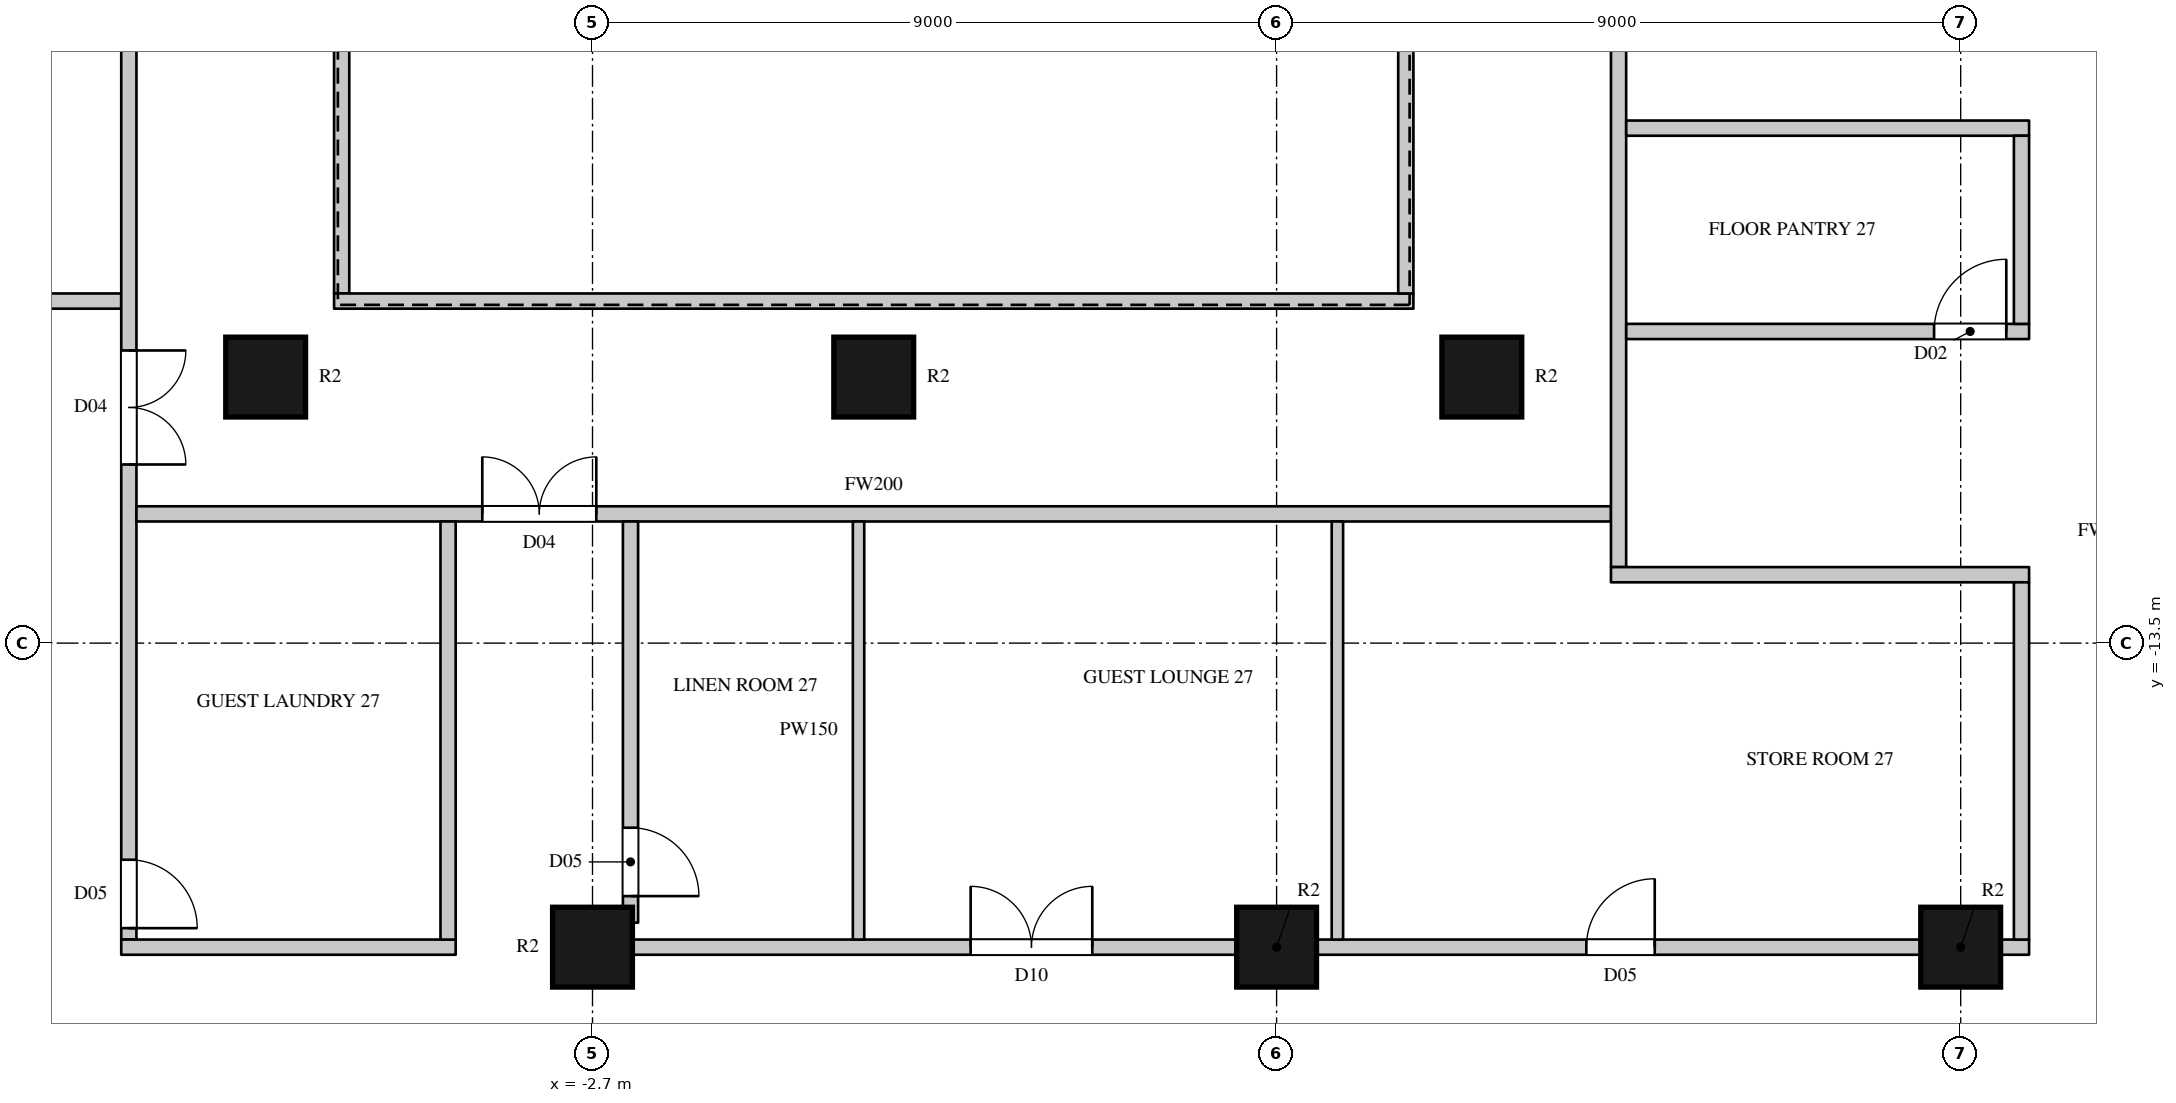
"""IFC4 building model, lengths in metres.
Left out: names, types, materials, properties, quantities, classifications, styles, units other than length and angle.
Written with IfcOpenShell. Run it as: python <this file> out.ifc"""

import sys

from ifc_helpers import new_model, si_unit, direction, frame, frame_2d, origin, origin_2d, place, context, subcontext, project, spatial, rectangle, circle, extrude, element, fill, save


model = new_model("IFC4")
c1 = context("Model", 3, precision=1e-05, world=origin(), true_north=direction((0.0, 1.0)))
c2 = subcontext(c1, "Body", "Model", "MODEL_VIEW")
j1 = project(units=[si_unit("LENGTHUNIT", "METRE"), si_unit("PLANEANGLEUNIT", "RADIAN")], contexts=[c1])
p1 = place(None, origin())
s1 = spatial("IfcSite", under=j1, at=p1, CompositionType="ELEMENT")
p2 = place(p1, origin())
s2 = spatial("IfcBuilding", under=s1, at=p2, CompositionType="ELEMENT")
p3 = place(p2, frame((0.0, 0.0, 127.5)))
s3 = spatial("IfcBuildingStorey", under=s2, at=p3, CompositionType="ELEMENT", Elevation=127.5)
for number, where, z_axis, x_axis in (
    (1, (-2.7, -17.5, 0.0), (0.0, 0.0, 1.0), (1.0, 0.0, 0.0)),
    (2, (6.3, -17.5, 0.0), (0.0, 0.0, 1.0), (1.0, 0.0, 0.0)),
    (3, (15.3, -17.5, 0.0), (0.0, 0.0, 1.0), (1.0, 0.0, 0.0)),
    (4, (-7.0, -10.0, 0.0), (0.0, 0.0, 1.0), (1.0, 0.0, 0.0)),
    (5, (1.0, -10.0, 0.0), (0.0, 0.0, 1.0), (1.0, 0.0, 0.0)),
    (6, (9.0, -10.0, 0.0), (0.0, 0.0, 1.0), (1.0, 0.0, 0.0)),
):
    element("IfcColumn", number, at=place(p3, frame(where, z_axis=z_axis, x_axis=x_axis)), inside=s3, PredefinedType="COLUMN", context=c2, shape_type="SweptSolid", body=[
        extrude(circle(Radius=0.525, at=origin_2d()), origin(), (0.0, 0.0, 1.0), 3.6),
    ])
p4 = place(p3, frame((-13.97, -9.0, 0.0), z_axis=(0.0, 0.0, 1.0), x_axis=(1.0, 0.0, 0.0)))
e7 = element("IfcWall", 7, at=p4, inside=s3, PredefinedType="PARTITIONING", context=c2, shape_type="SweptSolid", body=[
    extrude(rectangle(XDim=5.07, YDim=0.2, at=frame_2d((2.535, 0.0))), origin(), (0.0, 0.0, 1.0), 3.3),
])
p5 = place(p4, frame((0.4, 0.0, 0.0)))
e8 = element("IfcOpeningElement", 8, at=p5, cuts=e7, PredefinedType="OPENING", context=c2, shape_type="SweptSolid", body=[
    extrude(rectangle(XDim=1.5, YDim=2.2, at=frame_2d((0.75, 1.1))), frame((0.0, 0.11, 0.0), z_axis=(0.0, -1.0, 0.0), x_axis=(1.0, 0.0, 0.0)), (0.0, 0.0, 1.0), 0.22),
])
p6 = place(p4, frame((2.05, 0.0, 0.0)))
e9 = element("IfcOpeningElement", 9, at=p6, cuts=e7, PredefinedType="OPENING", context=c2, shape_type="SweptSolid", body=[
    extrude(rectangle(XDim=1.5, YDim=2.2, at=frame_2d((0.75, 1.1))), frame((0.0, 0.11, 0.0), z_axis=(0.0, -1.0, 0.0), x_axis=(1.0, 0.0, 0.0)), (0.0, 0.0, 1.0), 0.22),
])
p7 = place(p3, frame((-8.8, -17.4, 0.0), z_axis=(0.0, 0.0, 1.0), x_axis=(0.0, 1.0, 0.0)))
e10 = element("IfcWall", 10, at=p7, inside=s3, PredefinedType="PARTITIONING", context=c2, shape_type="SweptSolid", body=[
    extrude(rectangle(XDim=29.1, YDim=0.2, at=frame_2d((14.55, 0.0))), origin(), (0.0, 0.0, 1.0), 3.3),
])
p8 = place(p7, frame((21.15, 0.0, 0.0)))
e11 = element("IfcOpeningElement", 11, at=p8, cuts=e10, PredefinedType="OPENING", context=c2, shape_type="SweptSolid", body=[
    extrude(rectangle(XDim=1.5, YDim=2.2, at=frame_2d((0.75, 1.1))), frame((0.0, 0.11, 0.0), z_axis=(0.0, -1.0, 0.0), x_axis=(1.0, 0.0, 0.0)), (0.0, 0.0, 1.0), 0.22),
])
p9 = place(p7, frame((6.25, 0.0, 0.0)))
e12 = element("IfcOpeningElement", 12, at=p9, cuts=e10, PredefinedType="OPENING", context=c2, shape_type="SweptSolid", body=[
    extrude(rectangle(XDim=1.5, YDim=2.2, at=frame_2d((0.75, 1.1))), frame((0.0, 0.11, 0.0), z_axis=(0.0, -1.0, 0.0), x_axis=(1.0, 0.0, 0.0)), (0.0, 0.0, 1.0), 0.22),
])
p10 = place(p7, frame((27.45, 0.0, 0.0)))
e13 = element("IfcOpeningElement", 13, at=p10, cuts=e10, PredefinedType="OPENING", context=c2, shape_type="SweptSolid", body=[
    extrude(rectangle(XDim=1.5, YDim=2.2, at=frame_2d((0.75, 1.1))), frame((0.0, 0.11, 0.0), z_axis=(0.0, -1.0, 0.0), x_axis=(1.0, 0.0, 0.0)), (0.0, 0.0, 1.0), 0.22),
])
p11 = place(p7, frame((0.15, 0.0, 0.0)))
e14 = element("IfcOpeningElement", 14, at=p11, cuts=e10, PredefinedType="OPENING", context=c2, shape_type="SweptSolid", body=[
    extrude(rectangle(XDim=0.9, YDim=2.2, at=frame_2d((0.45, 1.1))), frame((0.0, 0.11, 0.0), z_axis=(0.0, -1.0, 0.0), x_axis=(1.0, 0.0, 0.0)), (0.0, 0.0, 1.0), 0.22),
])
p12 = place(p3, frame((-8.9, -17.5, 0.0), z_axis=(0.0, 0.0, 1.0), x_axis=(1.0, 0.0, 0.0)))
e15 = element("IfcWall", 15, at=p12, inside=s3, PredefinedType="PARTITIONING", context=c2, shape_type="SweptSolid", body=[
    extrude(rectangle(XDim=4.4, YDim=0.2, at=frame_2d((2.2, 0.0))), origin(), (0.0, 0.0, 1.0), 2.75),
])
p13 = place(p3, frame((-8.7, -11.8, 0.0), z_axis=(0.0, 0.0, 1.0), x_axis=(1.0, 0.0, 0.0)))
e16 = element("IfcWall", 16, at=p13, inside=s3, PredefinedType="PARTITIONING", context=c2, shape_type="SweptSolid", body=[
    extrude(rectangle(XDim=19.4, YDim=0.2, at=frame_2d((9.7, 0.0))), origin(), (0.0, 0.0, 1.0), 3.3),
])
p14 = place(p13, frame((4.55, 0.0, 0.0)))
e17 = element("IfcOpeningElement", 17, at=p14, cuts=e16, PredefinedType="OPENING", context=c2, shape_type="SweptSolid", body=[
    extrude(rectangle(XDim=1.5, YDim=2.2, at=frame_2d((0.75, 1.1))), frame((0.0, 0.11, 0.0), z_axis=(0.0, -1.0, 0.0), x_axis=(1.0, 0.0, 0.0)), (0.0, 0.0, 1.0), 0.22),
])
p15 = place(p3, frame((-6.0, -8.9, 0.0), z_axis=(0.0, 0.0, 1.0), x_axis=(0.0, 1.0, 0.0)))
e18 = element("IfcWall", 18, at=p15, inside=s3, PredefinedType="PARTITIONING", context=c2, shape_type="SweptSolid", body=[
    extrude(rectangle(XDim=17.8, YDim=0.2, at=frame_2d((8.9, 0.0))), origin(), (0.0, 0.0, 1.0), 3.3),
])
p16 = place(p3, frame((-6.1, -9.0, 0.0), z_axis=(0.0, 0.0, 1.0), x_axis=(1.0, 0.0, 0.0)))
e19 = element("IfcWall", 19, at=p16, inside=s3, PredefinedType="PARTITIONING", context=c2, shape_type="SweptSolid", body=[
    extrude(rectangle(XDim=14.2, YDim=0.2, at=frame_2d((7.1, 0.0))), origin(), (0.0, 0.0, 1.0), 3.3),
])
p17 = place(p3, frame((-4.6, -17.4, 0.0), z_axis=(0.0, 0.0, 1.0), x_axis=(0.0, 1.0, 0.0)))
e20 = element("IfcWall", 20, at=p17, inside=s3, PredefinedType="PARTITIONING", context=c2, shape_type="SweptSolid", body=[
    extrude(rectangle(XDim=5.5, YDim=0.2, at=frame_2d((2.75, 0.0))), origin(), (0.0, 0.0, 1.0), 3.3),
])
p18 = place(p3, frame((-2.2, -17.178, 0.0), z_axis=(0.0, 0.0, 1.0), x_axis=(0.0, 1.0, 0.0)))
e21 = element("IfcWall", 21, at=p18, inside=s3, PredefinedType="PARTITIONING", context=c2, shape_type="SweptSolid", body=[
    extrude(rectangle(XDim=5.279, YDim=0.2, at=frame_2d((2.639, 0.0))), origin(), (0.0, 0.0, 1.0), 3.3),
])
p19 = place(p18, frame((0.35, 0.0, 0.0)))
e22 = element("IfcOpeningElement", 22, at=p19, cuts=e21, PredefinedType="OPENING", context=c2, shape_type="SweptSolid", body=[
    extrude(rectangle(XDim=0.9, YDim=2.2, at=frame_2d((0.45, 1.1))), frame((0.0, 0.11, 0.0), z_axis=(0.0, -1.0, 0.0), x_axis=(1.0, 0.0, 0.0)), (0.0, 0.0, 1.0), 0.22),
])
p20 = place(p3, frame((-2.175, -17.5, 0.0), z_axis=(0.0, 0.0, 1.0), x_axis=(1.0, 0.0, 0.0)))
e23 = element("IfcWall", 23, at=p20, inside=s3, PredefinedType="PARTITIONING", context=c2, shape_type="SweptSolid", body=[
    extrude(rectangle(XDim=7.95, YDim=0.2, at=frame_2d((3.975, 0.0))), origin(), (0.0, 0.0, 1.0), 2.75),
])
p21 = place(p20, frame((4.45, 0.0, 0.0)))
e24 = element("IfcOpeningElement", 24, at=p21, cuts=e23, PredefinedType="OPENING", context=c2, shape_type="SweptSolid", body=[
    extrude(rectangle(XDim=1.6, YDim=2.4, at=frame_2d((0.8, 1.2))), frame((0.0, 0.11, 0.0), z_axis=(0.0, -1.0, 0.0), x_axis=(1.0, 0.0, 0.0)), (0.0, 0.0, 1.0), 0.22),
])
p22 = place(p3, frame((6.825, -17.5, 0.0), z_axis=(0.0, 0.0, 1.0), x_axis=(1.0, 0.0, 0.0)))
e25 = element("IfcWall", 25, at=p22, inside=s3, PredefinedType="PARTITIONING", context=c2, shape_type="SweptSolid", body=[
    extrude(rectangle(XDim=7.95, YDim=0.2, at=frame_2d((3.975, 0.0))), origin(), (0.0, 0.0, 1.0), 2.75),
])
p23 = place(p22, frame((3.55, 0.0, 0.0)))
e26 = element("IfcOpeningElement", 26, at=p23, cuts=e25, PredefinedType="OPENING", context=c2, shape_type="SweptSolid", body=[
    extrude(rectangle(XDim=0.9, YDim=2.2, at=frame_2d((0.45, 1.1))), frame((0.0, 0.11, 0.0), z_axis=(0.0, -1.0, 0.0), x_axis=(1.0, 0.0, 0.0)), (0.0, 0.0, 1.0), 0.22),
])
p24 = place(p3, frame((15.825, -17.5, 0.0), z_axis=(0.0, 0.0, 1.0), x_axis=(1.0, 0.0, 0.0)))
e27 = element("IfcWall", 27, at=p24, inside=s3, PredefinedType="PARTITIONING", context=c2, shape_type="SweptSolid", body=[
    extrude(rectangle(XDim=0.375, YDim=0.2, at=frame_2d((0.188, 0.0))), origin(), (0.0, 0.0, 1.0), 3.3),
])
p25 = place(p3, frame((8.0, -8.9, 0.0), z_axis=(0.0, 0.0, 1.0), x_axis=(0.0, 1.0, 0.0)))
e28 = element("IfcWall", 28, at=p25, inside=s3, PredefinedType="PARTITIONING", context=c2, shape_type="SweptSolid", body=[
    extrude(rectangle(XDim=17.8, YDim=0.2, at=frame_2d((8.9, 0.0))), origin(), (0.0, 0.0, 1.0), 3.3),
])
p26 = place(p3, frame((10.799, -12.5, 0.0), z_axis=(0.0, 0.0, 1.0), x_axis=(0.0, 1.0, 0.0)))
e29 = element("IfcWall", 29, at=p26, inside=s3, PredefinedType="PARTITIONING", context=c2, shape_type="SweptSolid", body=[
    extrude(rectangle(XDim=24.2, YDim=0.2, at=frame_2d((12.1, 0.0))), origin(), (0.0, 0.0, 1.0), 3.3),
])
p27 = place(p26, frame((13.15, 0.0, 0.0)))
e30 = element("IfcOpeningElement", 30, at=p27, cuts=e29, PredefinedType="OPENING", context=c2, shape_type="SweptSolid", body=[
    extrude(rectangle(XDim=1.5, YDim=2.2, at=frame_2d((0.75, 1.1))), frame((0.0, 0.11, 0.0), z_axis=(0.0, -1.0, 0.0), x_axis=(1.0, 0.0, 0.0)), (0.0, 0.0, 1.0), 0.22),
])
p28 = place(p3, frame((10.699, -12.6, 0.0), z_axis=(0.0, 0.0, 1.0), x_axis=(1.0, 0.0, 0.0)))
e31 = element("IfcWall", 31, at=p28, inside=s3, PredefinedType="PARTITIONING", context=c2, shape_type="SweptSolid", body=[
    extrude(rectangle(XDim=5.501, YDim=0.2, at=frame_2d((2.75, 0.0))), origin(), (0.0, 0.0, 1.0), 3.3),
])
p29 = place(p3, frame((10.9, -9.4, 0.0), z_axis=(0.0, 0.0, 1.0), x_axis=(1.0, 0.0, 0.0)))
e32 = element("IfcWall", 32, at=p29, inside=s3, PredefinedType="PARTITIONING", context=c2, shape_type="SweptSolid", body=[
    extrude(rectangle(XDim=5.3, YDim=0.2, at=frame_2d((2.65, 0.0))), origin(), (0.0, 0.0, 1.0), 3.3),
])
p30 = place(p29, frame((4.05, 0.0, 0.0)))
e33 = element("IfcOpeningElement", 33, at=p30, cuts=e32, PredefinedType="OPENING", context=c2, shape_type="SweptSolid", body=[
    extrude(rectangle(XDim=0.95, YDim=2.2, at=frame_2d((0.475, 1.1))), frame((0.0, 0.11, 0.0), z_axis=(0.0, -1.0, 0.0), x_axis=(1.0, 0.0, 0.0)), (0.0, 0.0, 1.0), 0.22),
])
p31 = place(p3, frame((10.9, -6.725, 0.0), z_axis=(0.0, 0.0, 1.0), x_axis=(1.0, 0.0, 0.0)))
e34 = element("IfcWall", 34, at=p31, inside=s3, PredefinedType="PARTITIONING", context=c2, shape_type="SweptSolid", body=[
    extrude(rectangle(XDim=5.3, YDim=0.2, at=frame_2d((2.65, 0.0))), origin(), (0.0, 0.0, 1.0), 3.3),
])
p32 = place(p3, frame((16.1, -17.4, 0.0), z_axis=(0.0, 0.0, 1.0), x_axis=(0.0, 1.0, 0.0)))
e35 = element("IfcWall", 35, at=p32, inside=s3, PredefinedType="PARTITIONING", context=c2, shape_type="SweptSolid", body=[
    extrude(rectangle(XDim=4.7, YDim=0.2, at=frame_2d((2.35, 0.0))), origin(), (0.0, 0.0, 1.0), 3.3),
])
p33 = place(p3, frame((16.1, -9.3, 0.0), z_axis=(0.0, 0.0, 1.0), x_axis=(0.0, 1.0, 0.0)))
e36 = element("IfcWall", 36, at=p33, inside=s3, PredefinedType="PARTITIONING", context=c2, shape_type="SweptSolid", body=[
    extrude(rectangle(XDim=2.475, YDim=0.2, at=frame_2d((1.238, 0.0))), origin(), (0.0, 0.0, 1.0), 3.3),
])
for number, where, z_axis, x_axis in (
    (37, (0.8, -17.4, 0.0), (0.0, 0.0, 1.0), (0.0, 1.0, 0.0)),
    (38, (7.1, -17.4, 0.0), (0.0, 0.0, 1.0), (0.0, 1.0, 0.0)),
):
    element("IfcWall", number, at=place(p3, frame(where, z_axis=z_axis, x_axis=x_axis)), inside=s3, PredefinedType="PARTITIONING", context=c2, shape_type="SweptSolid", body=[
        extrude(rectangle(XDim=5.5, YDim=0.15, at=frame_2d((2.75, 0.0))), origin(), (0.0, 0.0, 1.0), 3.3),
    ])
p34 = place(p9, origin())
e39 = element("IfcDoor", 39, at=p34, inside=s3, OperationType="DOUBLE_DOOR_SINGLE_SWING", PredefinedType="DOOR", context=c2, shape_type="SweptSolid", body=[
    extrude(rectangle(XDim=1.5, YDim=2.2, at=frame_2d((0.75, 1.1))), frame((0.0, 0.025, 0.0), z_axis=(0.0, -1.0, 0.0), x_axis=(1.0, 0.0, 0.0)), (0.0, 0.0, 1.0), 0.05),
])
fill(e12, e39)
p35 = place(p14, origin())
e40 = element("IfcDoor", 40, at=p35, inside=s3, OperationType="DOUBLE_DOOR_SINGLE_SWING", PredefinedType="DOOR", context=c2, shape_type="SweptSolid", body=[
    extrude(rectangle(XDim=1.5, YDim=2.2, at=frame_2d((0.75, 1.1))), frame((0.0, 0.025, 0.0), z_axis=(0.0, -1.0, 0.0), x_axis=(1.0, 0.0, 0.0)), (0.0, 0.0, 1.0), 0.05),
])
fill(e17, e40)
p36 = place(p11, origin())
e41 = element("IfcDoor", 41, at=p36, inside=s3, OperationType="SINGLE_SWING_RIGHT", PredefinedType="DOOR", context=c2, shape_type="SweptSolid", body=[
    extrude(rectangle(XDim=0.9, YDim=2.2, at=frame_2d((0.45, 1.1))), frame((0.0, 0.025, 0.0), z_axis=(0.0, -1.0, 0.0), x_axis=(1.0, 0.0, 0.0)), (0.0, 0.0, 1.0), 0.05),
])
fill(e14, e41)
p37 = place(p19, origin())
e42 = element("IfcDoor", 42, at=p37, inside=s3, OperationType="SINGLE_SWING_RIGHT", PredefinedType="DOOR", context=c2, shape_type="SweptSolid", body=[
    extrude(rectangle(XDim=0.9, YDim=2.2, at=frame_2d((0.45, 1.1))), frame((0.0, 0.025, 0.0), z_axis=(0.0, -1.0, 0.0), x_axis=(1.0, 0.0, 0.0)), (0.0, 0.0, 1.0), 0.05),
])
fill(e22, e42)
p38 = place(p21, origin())
e43 = element("IfcDoor", 43, at=p38, inside=s3, OperationType="DOUBLE_DOOR_SINGLE_SWING", PredefinedType="DOOR", context=c2, shape_type="SweptSolid", body=[
    extrude(rectangle(XDim=1.6, YDim=2.4, at=frame_2d((0.8, 1.2))), frame((0.0, 0.025, 0.0), z_axis=(0.0, -1.0, 0.0), x_axis=(1.0, 0.0, 0.0)), (0.0, 0.0, 1.0), 0.05),
])
fill(e24, e43)
p39 = place(p23, origin())
e44 = element("IfcDoor", 44, at=p39, inside=s3, OperationType="SINGLE_SWING_RIGHT", PredefinedType="DOOR", context=c2, shape_type="SweptSolid", body=[
    extrude(rectangle(XDim=0.9, YDim=2.2, at=frame_2d((0.45, 1.1))), frame((0.0, 0.025, 0.0), z_axis=(0.0, -1.0, 0.0), x_axis=(1.0, 0.0, 0.0)), (0.0, 0.0, 1.0), 0.05),
])
fill(e26, e44)
p40 = place(p30, origin())
e45 = element("IfcDoor", 45, at=p40, inside=s3, OperationType="SINGLE_SWING_RIGHT", PredefinedType="DOOR", context=c2, shape_type="SweptSolid", body=[
    extrude(rectangle(XDim=0.95, YDim=2.2, at=frame_2d((0.475, 1.1))), frame((0.0, 0.025, 0.0), z_axis=(0.0, -1.0, 0.0), x_axis=(1.0, 0.0, 0.0)), (0.0, 0.0, 1.0), 0.05),
])
fill(e33, e45)
save(model, sys.argv[1])
